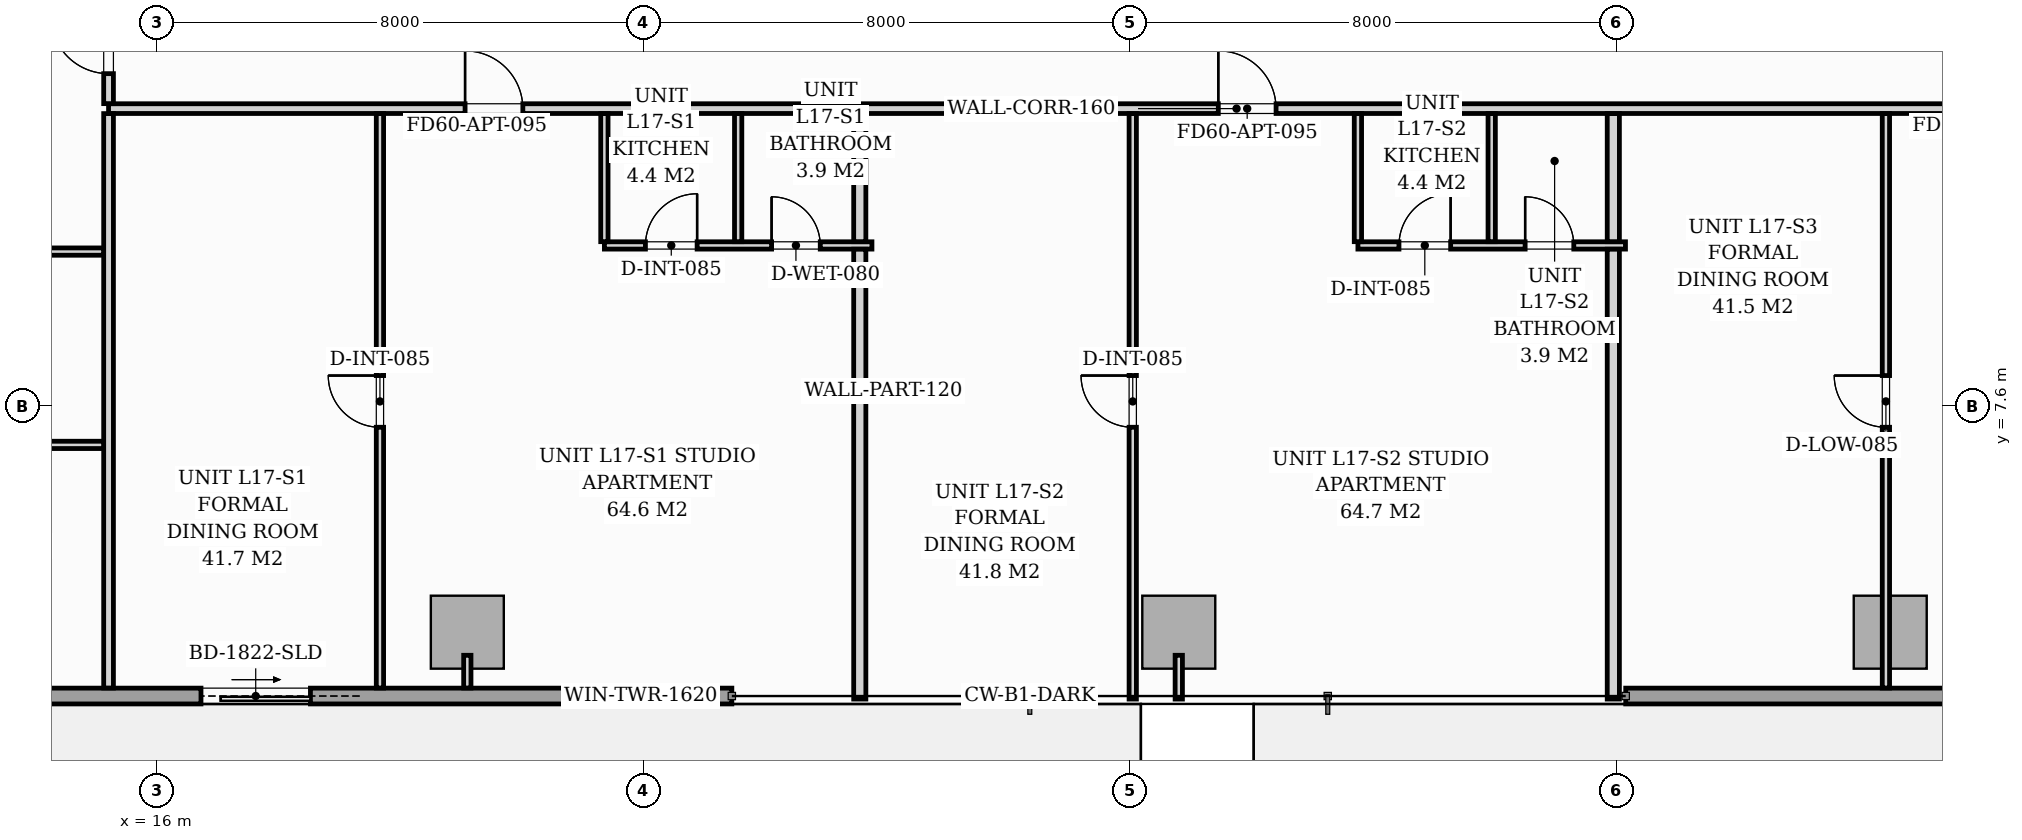
"""IFC4 building model, lengths in metres.
Left out: names, types, materials, properties, quantities, classifications, styles, units other than length and angle.
Written with IfcOpenShell. Run it as: python <this file> out.ifc"""

import sys

from ifc_helpers import new_model, si_unit, direction, frame, frame_2d, origin, origin_2d, place, context, subcontext, project, spatial, rectangle, extrude, source, transform, mapped, element, fill, save


model = new_model("IFC4")
c1 = context("Model", 3, precision=1e-05, world=origin(), true_north=direction((0.0, 1.0)))
c2 = subcontext(c1, "Body", "Model", "MODEL_VIEW")
j1 = project(units=[si_unit("LENGTHUNIT", "METRE"), si_unit("PLANEANGLEUNIT", "RADIAN")], contexts=[c1])
p1 = place(None, origin())
s1 = spatial("IfcSite", under=j1, at=p1, CompositionType="ELEMENT")
p2 = place(p1, origin())
s2 = spatial("IfcBuilding", under=s1, at=p2, CompositionType="ELEMENT")
p3 = place(p2, frame((0.0, 0.0, 61.4)))
s3 = spatial("IfcBuildingStorey", under=s2, at=p3, CompositionType="ELEMENT", Elevation=61.4)
m1 = source(origin(), c2, "Body", "SweptSolid", [
    extrude(rectangle(XDim=1.2, YDim=1.2, at=origin_2d()), origin(), (0.0, 0.0, 1.0), 3.196),
])
for number, where, z_axis, x_axis in (
    (1, (21.1, 3.88, 0.002), (0.0, 0.0, 1.0), (1.0, 0.0, 0.0)),
    (2, (32.8, 3.88, 0.002), (0.0, 0.0, 1.0), (1.0, 0.0, 0.0)),
    (3, (44.5, 3.88, 0.002), (0.0, 0.0, 1.0), (1.0, 0.0, 0.0)),
):
    element("IfcColumn", number, at=place(p3, frame(where, z_axis=z_axis, x_axis=x_axis)), inside=s3, PredefinedType="COLUMN", context=c2, shape_type="MappedRepresentation", body=[
        mapped(m1, transform((0.0, 0.0, 0.0), scale=1.0)),
    ])
p4 = place(p3, frame((57.3, 2.83, 0.0), z_axis=(0.0, 0.0, 1.0), x_axis=(-1.0, 0.0, 0.0)))
e4 = element("IfcWall", 4, at=p4, inside=s3, PredefinedType="STANDARD", context=c2, shape_type="SweptSolid", body=[
    extrude(rectangle(XDim=17.15, YDim=0.26, at=frame_2d((8.575, 0.0))), origin(), (0.0, 0.0, 1.0), 2.94),
])
p5 = place(p4, frame((8.804, 0.0, 0.0)))
e5 = element("IfcOpeningElement", 5, at=p5, cuts=e4, PredefinedType="OPENING", context=c2, shape_type="SweptSolid", body=[
    extrude(rectangle(XDim=1.8, YDim=2.06, at=frame_2d((0.9, 1.03))), frame((0.0, 0.14, 0.0), z_axis=(0.0, -1.0, 0.0), x_axis=(1.0, 0.0, 0.0)), (0.0, 0.0, 1.0), 0.28),
])
p6 = place(p4, frame((2.05, 0.0, 0.65)))
e6 = element("IfcOpeningElement", 6, at=p6, cuts=e4, PredefinedType="OPENING", context=c2, shape_type="SweptSolid", body=[
    extrude(rectangle(XDim=1.6, YDim=1.5, at=frame_2d((0.8, 0.75))), frame((0.0, 0.14, 0.0), z_axis=(0.0, -1.0, 0.0), x_axis=(1.0, 0.0, 0.0)), (0.0, 0.0, 1.0), 0.28),
])
p7 = place(p3, frame((25.45, 2.83, 0.0), z_axis=(0.0, 0.0, 1.0), x_axis=(-1.0, 0.0, 0.0)))
e7 = element("IfcWall", 7, at=p7, inside=s3, PredefinedType="STANDARD", context=c2, shape_type="SweptSolid", body=[
    extrude(rectangle(XDim=17.15, YDim=0.26, at=frame_2d((8.575, 0.0))), origin(), (0.0, 0.0, 1.0), 2.94),
])
p8 = place(p7, frame((6.93, 0.0, 0.0)))
e8 = element("IfcOpeningElement", 8, at=p8, cuts=e7, PredefinedType="OPENING", context=c2, shape_type="SweptSolid", body=[
    extrude(rectangle(XDim=1.8, YDim=2.06, at=frame_2d((0.9, 1.03))), frame((0.0, 0.14, 0.0), z_axis=(0.0, -1.0, 0.0), x_axis=(1.0, 0.0, 0.0)), (0.0, 0.0, 1.0), 0.28),
])
p9 = place(p7, frame((0.7, 0.0, 0.65)))
e9 = element("IfcOpeningElement", 9, at=p9, cuts=e7, PredefinedType="OPENING", context=c2, shape_type="SweptSolid", body=[
    extrude(rectangle(XDim=1.6, YDim=1.5, at=frame_2d((0.8, 0.75))), frame((0.0, 0.14, 0.0), z_axis=(0.0, -1.0, 0.0), x_axis=(1.0, 0.0, 0.0)), (0.0, 0.0, 1.0), 0.28),
])
p10 = place(p3, frame((15.2, 12.49, 0.0), z_axis=(0.0, 0.0, 1.0), x_axis=(1.0, 0.0, 0.0)))
e10 = element("IfcWall", 10, at=p10, inside=s3, PredefinedType="PARTITIONING", context=c2, shape_type="SweptSolid", body=[
    extrude(rectangle(XDim=37.1, YDim=0.16, at=frame_2d((18.55, 0.0))), origin(), (0.0, 0.0, 1.0), 2.94),
])
p11 = place(p10, frame((5.863, 0.0, 0.0)))
e11 = element("IfcOpeningElement", 11, at=p11, cuts=e10, PredefinedType="OPENING", context=c2, shape_type="SweptSolid", body=[
    extrude(rectangle(XDim=0.95, YDim=2.06, at=frame_2d((0.475, 1.03))), frame((0.0, 0.09, 0.0), z_axis=(0.0, -1.0, 0.0), x_axis=(1.0, 0.0, 0.0)), (0.0, 0.0, 1.0), 0.18),
])
p12 = place(p10, frame((18.25, 0.0, 0.0)))
e12 = element("IfcOpeningElement", 12, at=p12, cuts=e10, PredefinedType="OPENING", context=c2, shape_type="SweptSolid", body=[
    extrude(rectangle(XDim=0.95, YDim=2.06, at=frame_2d((0.475, 1.03))), frame((0.0, 0.09, 0.0), z_axis=(0.0, -1.0, 0.0), x_axis=(1.0, 0.0, 0.0)), (0.0, 0.0, 1.0), 0.18),
])
p13 = place(p10, frame((30.63, 0.0, 0.0)))
e13 = element("IfcOpeningElement", 13, at=p13, cuts=e10, PredefinedType="OPENING", context=c2, shape_type="SweptSolid", body=[
    extrude(rectangle(XDim=0.95, YDim=2.06, at=frame_2d((0.475, 1.03))), frame((0.0, 0.09, 0.0), z_axis=(0.0, -1.0, 0.0), x_axis=(1.0, 0.0, 0.0)), (0.0, 0.0, 1.0), 0.18),
])
p14 = place(p3, frame((15.2, 2.962, 0.0), z_axis=(0.0, 0.0, 1.0), x_axis=(0.0, 1.0, 0.0)))
e14 = element("IfcWall", 14, at=p14, inside=s3, PredefinedType="PARTITIONING", context=c2, shape_type="SweptSolid", body=[
    extrude(rectangle(XDim=9.446, YDim=0.16, at=frame_2d((4.723, 0.0))), origin(), (0.0, 0.0, 1.0), 2.94),
])
p15 = place(p3, frame((15.2, 12.572, 0.0), z_axis=(0.0, 0.0, 1.0), x_axis=(0.0, 1.0, 0.0)))
e15 = element("IfcWall", 15, at=p15, inside=s3, PredefinedType="PARTITIONING", context=c2, shape_type="SweptSolid", body=[
    extrude(rectangle(XDim=14.866, YDim=0.16, at=frame_2d((7.433, 0.0))), origin(), (0.0, 0.0, 1.0), 2.94),
])
p16 = place(p15, frame((0.493, 0.0, 0.0)))
e16 = element("IfcOpeningElement", 16, at=p16, cuts=e15, PredefinedType="OPENING", context=c2, shape_type="SweptSolid", body=[
    extrude(rectangle(XDim=0.95, YDim=2.06, at=frame_2d((0.475, 1.03))), frame((0.0, 0.09, 0.0), z_axis=(0.0, -1.0, 0.0), x_axis=(1.0, 0.0, 0.0)), (0.0, 0.0, 1.0), 0.18),
])
p17 = place(p15, frame((6.413, 0.0, 0.0)))
e17 = element("IfcOpeningElement", 17, at=p17, cuts=e15, PredefinedType="OPENING", context=c2, shape_type="SweptSolid", body=[
    extrude(rectangle(XDim=0.95, YDim=2.06, at=frame_2d((0.475, 1.03))), frame((0.0, 0.09, 0.0), z_axis=(0.0, -1.0, 0.0), x_axis=(1.0, 0.0, 0.0)), (0.0, 0.0, 1.0), 0.18),
])
p18 = place(p3, frame((23.354, 10.24, 0.0), z_axis=(0.0, 0.0, 1.0), x_axis=(1.0, 0.0, 0.0)))
e18 = element("IfcWall", 18, at=p18, inside=s3, PredefinedType="PARTITIONING", context=c2, shape_type="SweptSolid", body=[
    extrude(rectangle(XDim=4.4, YDim=0.12, at=frame_2d((2.2, 0.0))), origin(), (0.0, 0.0, 1.0), 2.94),
])
p19 = place(p18, frame((0.675, 0.0, 0.0)))
e19 = element("IfcOpeningElement", 19, at=p19, cuts=e18, PredefinedType="OPENING", context=c2, shape_type="SweptSolid", body=[
    extrude(rectangle(XDim=0.85, YDim=2.05, at=frame_2d((0.425, 1.025))), frame((0.0, 0.07, 0.0), z_axis=(0.0, -1.0, 0.0), x_axis=(1.0, 0.0, 0.0)), (0.0, 0.0, 1.0), 0.14),
])
p20 = place(p18, frame((2.75, 0.0, 0.0)))
e20 = element("IfcOpeningElement", 20, at=p20, cuts=e18, PredefinedType="OPENING", context=c2, shape_type="SweptSolid", body=[
    extrude(rectangle(XDim=0.8, YDim=2.02, at=frame_2d((0.4, 1.01))), frame((0.0, 0.07, 0.0), z_axis=(0.0, -1.0, 0.0), x_axis=(1.0, 0.0, 0.0)), (0.0, 0.0, 1.0), 0.14),
])
for number, where, z_axis, x_axis in (
    (21, (23.354, 10.302, 0.0), (0.0, 0.0, 1.0), (0.0, 1.0, 0.0)),
    (22, (25.554, 10.302, 0.0), (0.0, 0.0, 1.0), (0.0, 1.0, 0.0)),
):
    element("IfcWall", number, at=place(p3, frame(where, z_axis=z_axis, x_axis=x_axis)), inside=s3, PredefinedType="PARTITIONING", context=c2, shape_type="SweptSolid", body=[
        extrude(rectangle(XDim=2.106, YDim=0.12, at=frame_2d((1.053, 0.0))), origin(), (0.0, 0.0, 1.0), 2.94),
    ])
p21 = place(p3, frame((19.663, 2.962, 0.0), z_axis=(0.0, 0.0, 1.0), x_axis=(0.0, 1.0, 0.0)))
e23 = element("IfcWall", 23, at=p21, inside=s3, PredefinedType="PARTITIONING", context=c2, shape_type="SweptSolid", body=[
    extrude(rectangle(XDim=9.446, YDim=0.12, at=frame_2d((4.723, 0.0))), origin(), (0.0, 0.0, 1.0), 2.94),
])
p22 = place(p21, frame((4.288, 0.0, 0.0)))
e24 = element("IfcOpeningElement", 24, at=p22, cuts=e23, PredefinedType="OPENING", context=c2, shape_type="SweptSolid", body=[
    extrude(rectangle(XDim=0.85, YDim=2.05, at=frame_2d((0.425, 1.025))), frame((0.0, 0.07, 0.0), z_axis=(0.0, -1.0, 0.0), x_axis=(1.0, 0.0, 0.0)), (0.0, 0.0, 1.0), 0.14),
])
p23 = place(p3, frame((27.554, 2.78, 0.0), z_axis=(0.0, 0.0, 1.0), x_axis=(0.0, 1.0, 0.0)))
e25 = element("IfcWall", 25, at=p23, inside=s3, PredefinedType="PARTITIONING", context=c2, shape_type="SweptSolid", body=[
    extrude(rectangle(XDim=7.398, YDim=0.2, at=frame_2d((3.699, 0.0))), origin(), (0.0, 0.0, 1.0), 2.94),
])
p24 = place(p3, frame((27.554, 10.302, 0.0), z_axis=(0.0, 0.0, 1.0), x_axis=(0.0, 1.0, 0.0)))
e26 = element("IfcWall", 26, at=p24, inside=s3, PredefinedType="PARTITIONING", context=c2, shape_type="SweptSolid", body=[
    extrude(rectangle(XDim=2.106, YDim=0.2, at=frame_2d((1.053, 0.0))), origin(), (0.0, 0.0, 1.0), 2.94),
])
p25 = place(p3, frame((35.746, 10.24, 0.0), z_axis=(0.0, 0.0, 1.0), x_axis=(1.0, 0.0, 0.0)))
e27 = element("IfcWall", 27, at=p25, inside=s3, PredefinedType="PARTITIONING", context=c2, shape_type="SweptSolid", body=[
    extrude(rectangle(XDim=4.4, YDim=0.12, at=frame_2d((2.2, 0.0))), origin(), (0.0, 0.0, 1.0), 2.94),
])
p26 = place(p25, frame((0.675, 0.0, 0.0)))
e28 = element("IfcOpeningElement", 28, at=p26, cuts=e27, PredefinedType="OPENING", context=c2, shape_type="SweptSolid", body=[
    extrude(rectangle(XDim=0.85, YDim=2.05, at=frame_2d((0.425, 1.025))), frame((0.0, 0.07, 0.0), z_axis=(0.0, -1.0, 0.0), x_axis=(1.0, 0.0, 0.0)), (0.0, 0.0, 1.0), 0.14),
])
p27 = place(p25, frame((2.75, 0.0, 0.0)))
e29 = element("IfcOpeningElement", 29, at=p27, cuts=e27, PredefinedType="OPENING", context=c2, shape_type="SweptSolid", body=[
    extrude(rectangle(XDim=0.8, YDim=2.02, at=frame_2d((0.4, 1.01))), frame((0.0, 0.07, 0.0), z_axis=(0.0, -1.0, 0.0), x_axis=(1.0, 0.0, 0.0)), (0.0, 0.0, 1.0), 0.14),
])
for number, where, z_axis, x_axis in (
    (30, (35.746, 10.302, 0.0), (0.0, 0.0, 1.0), (0.0, 1.0, 0.0)),
    (31, (37.946, 10.302, 0.0), (0.0, 0.0, 1.0), (0.0, 1.0, 0.0)),
):
    element("IfcWall", number, at=place(p3, frame(where, z_axis=z_axis, x_axis=x_axis)), inside=s3, PredefinedType="PARTITIONING", context=c2, shape_type="SweptSolid", body=[
        extrude(rectangle(XDim=2.106, YDim=0.12, at=frame_2d((1.053, 0.0))), origin(), (0.0, 0.0, 1.0), 2.94),
    ])
p28 = place(p3, frame((32.043, 2.78, 0.0), z_axis=(0.0, 0.0, 1.0), x_axis=(0.0, 1.0, 0.0)))
e32 = element("IfcWall", 32, at=p28, inside=s3, PredefinedType="PARTITIONING", context=c2, shape_type="SweptSolid", body=[
    extrude(rectangle(XDim=9.628, YDim=0.12, at=frame_2d((4.814, 0.0))), origin(), (0.0, 0.0, 1.0), 2.94),
])
p29 = place(p28, frame((4.47, 0.0, 0.0)))
e33 = element("IfcOpeningElement", 33, at=p29, cuts=e32, PredefinedType="OPENING", context=c2, shape_type="SweptSolid", body=[
    extrude(rectangle(XDim=0.85, YDim=2.05, at=frame_2d((0.425, 1.025))), frame((0.0, 0.07, 0.0), z_axis=(0.0, -1.0, 0.0), x_axis=(1.0, 0.0, 0.0)), (0.0, 0.0, 1.0), 0.14),
])
p30 = place(p3, frame((39.946, 2.78, 0.0), z_axis=(0.0, 0.0, 1.0), x_axis=(0.0, 1.0, 0.0)))
e34 = element("IfcWall", 34, at=p30, inside=s3, PredefinedType="PARTITIONING", context=c2, shape_type="SweptSolid", body=[
    extrude(rectangle(XDim=7.398, YDim=0.2, at=frame_2d((3.699, 0.0))), origin(), (0.0, 0.0, 1.0), 2.94),
])
p31 = place(p3, frame((39.946, 10.302, 0.0), z_axis=(0.0, 0.0, 1.0), x_axis=(0.0, 1.0, 0.0)))
e35 = element("IfcWall", 35, at=p31, inside=s3, PredefinedType="PARTITIONING", context=c2, shape_type="SweptSolid", body=[
    extrude(rectangle(XDim=2.106, YDim=0.2, at=frame_2d((1.053, 0.0))), origin(), (0.0, 0.0, 1.0), 2.94),
])
p32 = place(p3, frame((44.429, 2.962, 0.0), z_axis=(0.0, 0.0, 1.0), x_axis=(0.0, 1.0, 0.0)))
e36 = element("IfcWall", 36, at=p32, inside=s3, PredefinedType="PARTITIONING", context=c2, shape_type="SweptSolid", body=[
    extrude(rectangle(XDim=9.446, YDim=0.12, at=frame_2d((4.723, 0.0))), origin(), (0.0, 0.0, 1.0), 2.136),
])
p33 = place(p32, frame((4.288, 0.0, 0.0)))
e37 = element("IfcOpeningElement", 37, at=p33, cuts=e36, PredefinedType="OPENING", context=c2, shape_type="SweptSolid", body=[
    extrude(rectangle(XDim=0.85, YDim=2.01, at=frame_2d((0.425, 1.005))), frame((0.0, 0.07, 0.0), z_axis=(0.0, -1.0, 0.0), x_axis=(1.0, 0.0, 0.0)), (0.0, 0.0, 1.0), 0.14),
])
p34 = place(p3, frame((5.88, 6.96, 0.0), z_axis=(0.0, 0.0, 1.0), x_axis=(1.0, 0.0, 0.0)))
e38 = element("IfcWall", 38, at=p34, inside=s3, PredefinedType="PARTITIONING", context=c2, shape_type="SweptSolid", body=[
    extrude(rectangle(XDim=9.238, YDim=0.12, at=frame_2d((4.619, 0.0))), origin(), (0.0, 0.0, 1.0), 2.94),
])
p35 = place(p34, frame((4.185, 0.0, 0.0)))
e39 = element("IfcOpeningElement", 39, at=p35, cuts=e38, PredefinedType="OPENING", context=c2, shape_type="SweptSolid", body=[
    extrude(rectangle(XDim=0.85, YDim=2.05, at=frame_2d((0.425, 1.025))), frame((0.0, 0.07, 0.0), z_axis=(0.0, -1.0, 0.0), x_axis=(1.0, 0.0, 0.0)), (0.0, 0.0, 1.0), 0.14),
])
p36 = place(p3, frame((5.88, 10.139, 0.0), z_axis=(0.0, 0.0, 1.0), x_axis=(1.0, 0.0, 0.0)))
e40 = element("IfcWall", 40, at=p36, inside=s3, PredefinedType="PARTITIONING", context=c2, shape_type="SweptSolid", body=[
    extrude(rectangle(XDim=9.238, YDim=0.12, at=frame_2d((4.619, 0.0))), origin(), (0.0, 0.0, 1.0), 2.94),
])
p37 = place(p36, frame((4.185, 0.0, 0.0)))
e41 = element("IfcOpeningElement", 41, at=p37, cuts=e40, PredefinedType="OPENING", context=c2, shape_type="SweptSolid", body=[
    extrude(rectangle(XDim=0.85, YDim=2.05, at=frame_2d((0.425, 1.025))), frame((0.0, 0.07, 0.0), z_axis=(0.0, -1.0, 0.0), x_axis=(1.0, 0.0, 0.0)), (0.0, 0.0, 1.0), 0.14),
])
p38 = place(p3, frame((21.1, 3.5, 0.0), z_axis=(0.0, 0.0, 1.0), x_axis=(0.0, -1.0, 0.0)))
e42 = element("IfcWall", 42, at=p38, inside=s3, PredefinedType="PARTITIONING", context=c2, shape_type="SweptSolid", body=[
    extrude(rectangle(XDim=0.538, YDim=0.12, at=frame_2d((0.269, 0.0))), origin(), (0.0, 0.0, 1.0), 2.94),
])
p39 = place(p3, frame((32.8, 3.5, 0.0), z_axis=(0.0, 0.0, 1.0), x_axis=(0.0, -1.0, 0.0)))
e43 = element("IfcWall", 43, at=p39, inside=s3, PredefinedType="PARTITIONING", context=c2, shape_type="SweptSolid", body=[
    extrude(rectangle(XDim=0.72, YDim=0.12, at=frame_2d((0.36, 0.0))), origin(), (0.0, 0.0, 1.0), 2.94),
])
m2 = source(origin(), c2, "Body", "SweptSolid", [
    extrude(rectangle(XDim=1.8, YDim=2.06, at=frame_2d((0.9, 1.03))), frame((0.0, 0.025, 0.0), z_axis=(0.0, -1.0, 0.0), x_axis=(1.0, 0.0, 0.0)), (0.0, 0.0, 1.0), 0.05),
])
p40 = place(p8, origin())
e44 = element("IfcDoor", 44, at=p40, inside=s3, OperationType="SLIDING_TO_LEFT", PredefinedType="DOOR", context=c2, shape_type="MappedRepresentation", body=[
    mapped(m2, transform((0.0, 0.0, 0.0), scale=1.0)),
])
fill(e8, e44)
m3 = source(origin(), c2, "Body", "SweptSolid", [
    extrude(rectangle(XDim=1.6, YDim=1.5, at=frame_2d((0.8, 0.75))), frame((0.0, 0.03, 0.0), z_axis=(0.0, -1.0, 0.0), x_axis=(1.0, 0.0, 0.0)), (0.0, 0.0, 1.0), 0.06),
])
p41 = place(p9, origin())
e45 = element("IfcWindow", 45, at=p41, inside=s3, PartitioningType="SINGLE_PANEL", PredefinedType="WINDOW", context=c2, shape_type="MappedRepresentation", body=[
    mapped(m3, transform((0.0, 0.0, 0.0), scale=1.0)),
])
fill(e9, e45)
m4 = source(origin(), c2, "Body", "SweptSolid", [
    extrude(rectangle(XDim=0.85, YDim=2.05, at=frame_2d((0.425, 1.025))), frame((0.0, 0.025, 0.0), z_axis=(0.0, -1.0, 0.0), x_axis=(1.0, 0.0, 0.0)), (0.0, 0.0, 1.0), 0.05),
])
p42 = place(p22, origin())
e46 = element("IfcDoor", 46, at=p42, inside=s3, OperationType="SINGLE_SWING_RIGHT", PredefinedType="DOOR", context=c2, shape_type="MappedRepresentation", body=[
    mapped(m4, transform((0.0, 0.0, 0.0), scale=1.0)),
])
fill(e24, e46)
m5 = source(origin(), c2, "Body", "SweptSolid", [
    extrude(rectangle(XDim=0.95, YDim=2.06, at=frame_2d((0.475, 1.03))), frame((0.0, 0.025, 0.0), z_axis=(0.0, -1.0, 0.0), x_axis=(1.0, 0.0, 0.0)), (0.0, 0.0, 1.0), 0.05),
])
p43 = place(p11, origin())
e47 = element("IfcDoor", 47, at=p43, inside=s3, OperationType="SINGLE_SWING_LEFT", PredefinedType="DOOR", context=c2, shape_type="MappedRepresentation", body=[
    mapped(m5, transform((0.0, 0.0, 0.0), scale=1.0)),
])
fill(e11, e47)
p44 = place(p19, origin())
e48 = element("IfcDoor", 48, at=p44, inside=s3, OperationType="SINGLE_SWING_RIGHT", PredefinedType="DOOR", context=c2, shape_type="MappedRepresentation", body=[
    mapped(m4, transform((0.0, 0.0, 0.0), scale=1.0)),
])
fill(e19, e48)
m6 = source(origin(), c2, "Body", "SweptSolid", [
    extrude(rectangle(XDim=0.8, YDim=2.02, at=frame_2d((0.4, 1.01))), frame((0.0, 0.025, 0.0), z_axis=(0.0, -1.0, 0.0), x_axis=(1.0, 0.0, 0.0)), (0.0, 0.0, 1.0), 0.05),
])
p45 = place(p20, origin())
e49 = element("IfcDoor", 49, at=p45, inside=s3, OperationType="SINGLE_SWING_LEFT", PredefinedType="DOOR", context=c2, shape_type="MappedRepresentation", body=[
    mapped(m6, transform((0.0, 0.0, 0.0), scale=1.0)),
])
fill(e20, e49)
p46 = place(p29, origin())
e50 = element("IfcDoor", 50, at=p46, inside=s3, OperationType="SINGLE_SWING_RIGHT", PredefinedType="DOOR", context=c2, shape_type="MappedRepresentation", body=[
    mapped(m4, transform((0.0, 0.0, 0.0), scale=1.0)),
])
fill(e33, e50)
p47 = place(p12, origin())
e51 = element("IfcDoor", 51, at=p47, inside=s3, OperationType="SINGLE_SWING_LEFT", PredefinedType="DOOR", context=c2, shape_type="MappedRepresentation", body=[
    mapped(m5, transform((0.0, 0.0, 0.0), scale=1.0)),
])
fill(e12, e51)
p48 = place(p26, origin())
e52 = element("IfcDoor", 52, at=p48, inside=s3, OperationType="SINGLE_SWING_RIGHT", PredefinedType="DOOR", context=c2, shape_type="MappedRepresentation", body=[
    mapped(m4, transform((0.0, 0.0, 0.0), scale=1.0)),
])
fill(e28, e52)
p49 = place(p27, origin())
e53 = element("IfcDoor", 53, at=p49, inside=s3, OperationType="SINGLE_SWING_LEFT", PredefinedType="DOOR", context=c2, shape_type="MappedRepresentation", body=[
    mapped(m6, transform((0.0, 0.0, 0.0), scale=1.0)),
])
fill(e29, e53)
m7 = source(origin(), c2, "Body", "SweptSolid", [
    extrude(rectangle(XDim=0.85, YDim=2.01, at=frame_2d((0.425, 1.005))), frame((0.0, 0.025, 0.0), z_axis=(0.0, -1.0, 0.0), x_axis=(1.0, 0.0, 0.0)), (0.0, 0.0, 1.0), 0.05),
])
p50 = place(p33, origin())
e54 = element("IfcDoor", 54, at=p50, inside=s3, OperationType="SINGLE_SWING_RIGHT", PredefinedType="DOOR", context=c2, shape_type="MappedRepresentation", body=[
    mapped(m7, transform((0.0, 0.0, 0.0), scale=1.0)),
])
fill(e37, e54)
p51 = place(p16, origin())
e55 = element("IfcDoor", 55, at=p51, inside=s3, OperationType="SINGLE_SWING_RIGHT", PredefinedType="DOOR", context=c2, shape_type="MappedRepresentation", body=[
    mapped(m5, transform((0.0, 0.0, 0.0), scale=1.0)),
])
fill(e16, e55)
save(model, sys.argv[1])
